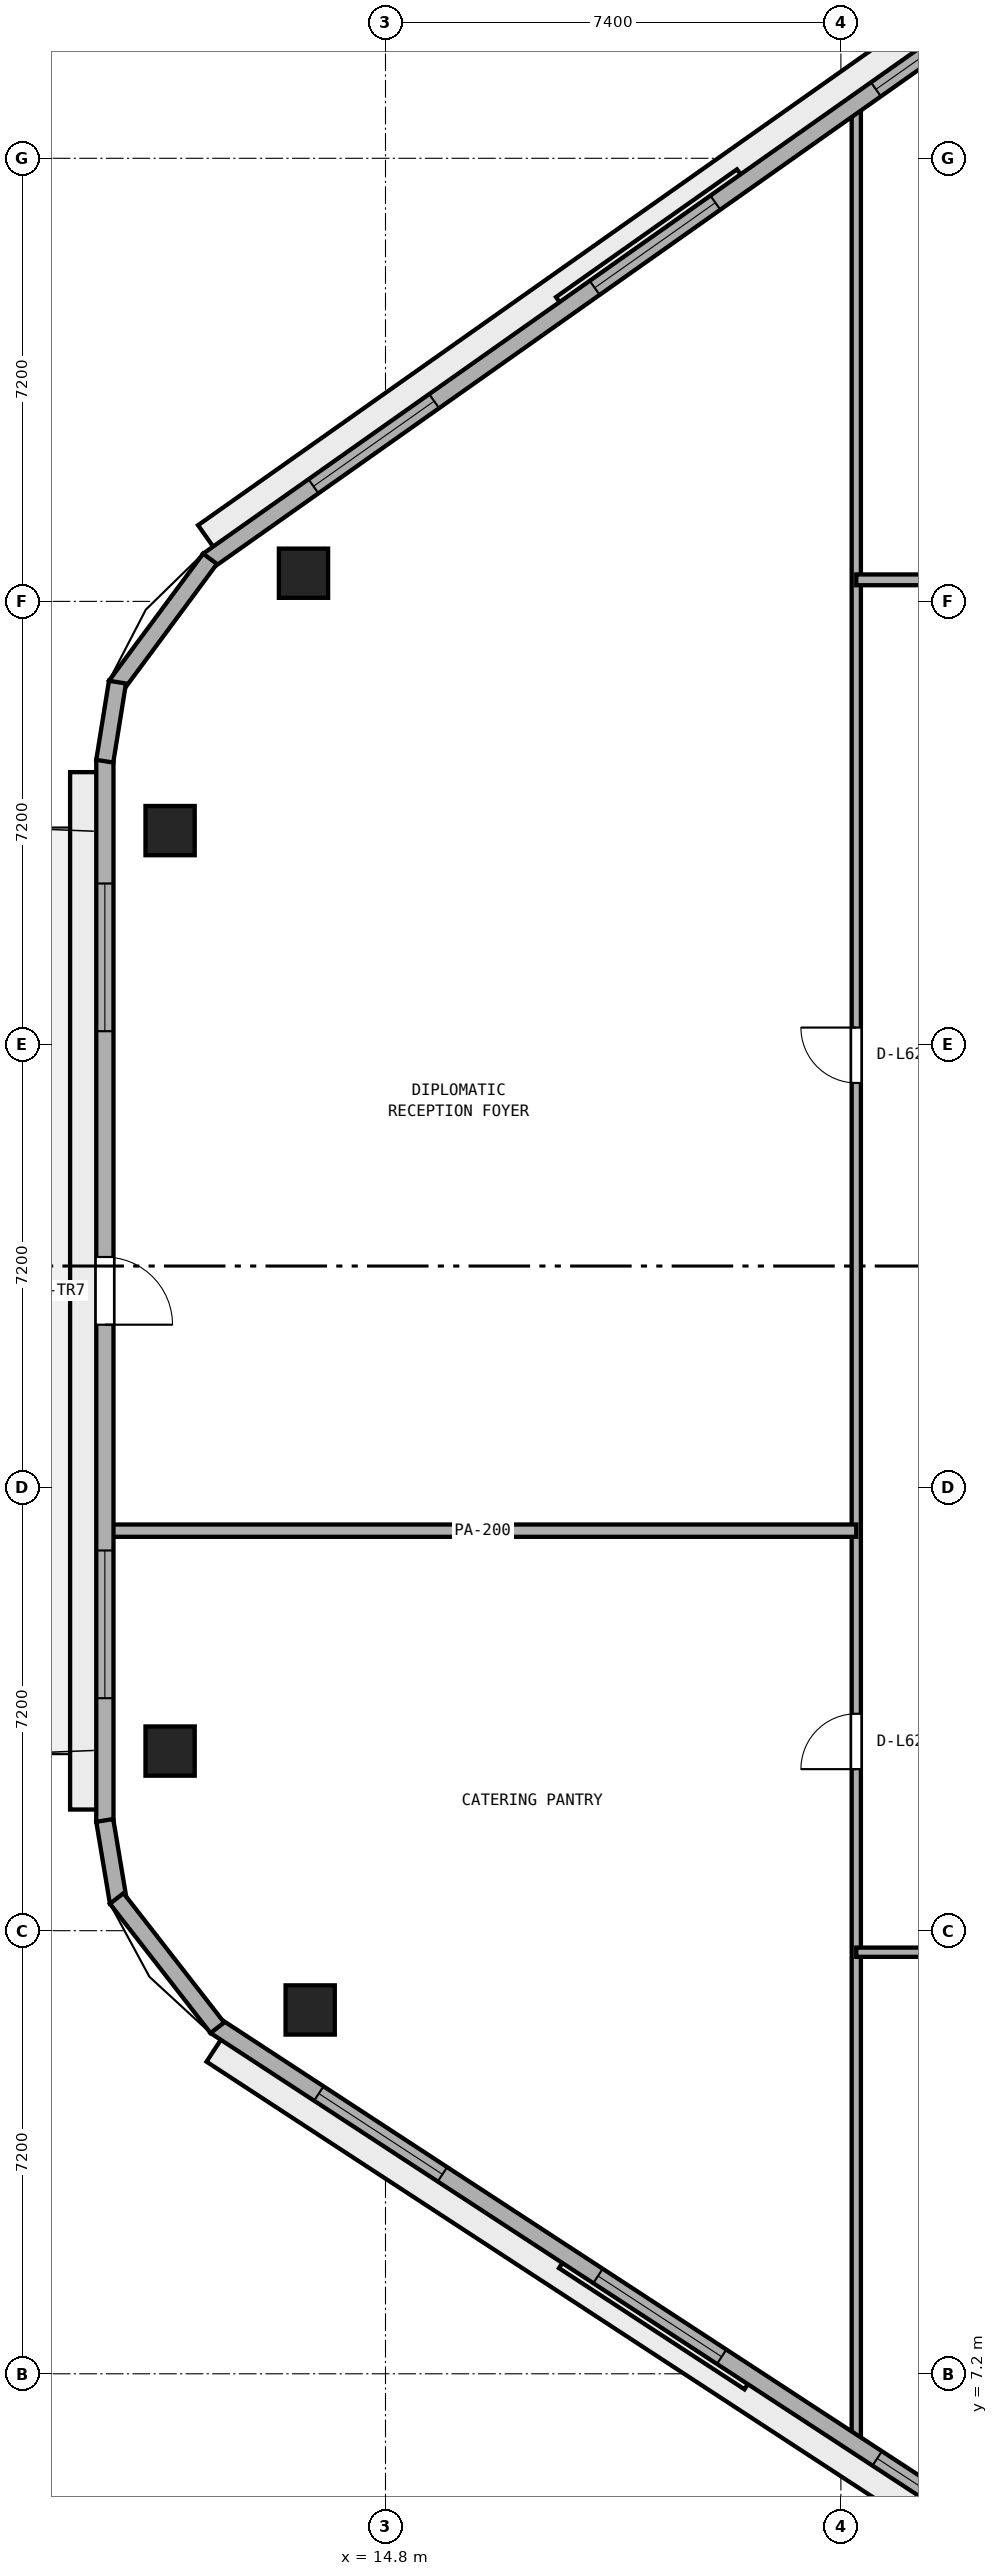
"""IFC4 building model, lengths in metres.
Left out: names, types, materials, properties, quantities, classifications, styles, units other than length and angle.
Written with IfcOpenShell. Run it as: python <this file> out.ifc"""

import sys

from ifc_helpers import new_model, si_unit, direction, frame, frame_2d, origin, origin_2d, place, context, subcontext, project, spatial, rectangle, extrude, element, fill, save


model = new_model("IFC4")
c1 = context("Model", 3, precision=1e-05, world=origin(), true_north=direction((0.0, 1.0)))
c2 = subcontext(c1, "Body", "Model", "MODEL_VIEW")
j1 = project(units=[si_unit("LENGTHUNIT", "METRE"), si_unit("PLANEANGLEUNIT", "RADIAN")], contexts=[c1])
p1 = place(None, origin())
s1 = spatial("IfcSite", under=j1, at=p1, CompositionType="ELEMENT")
p2 = place(p1, origin())
s2 = spatial("IfcBuilding", under=s1, at=p2, CompositionType="ELEMENT")
p3 = place(p2, frame((0.0, 0.0, 244.0)))
s3 = spatial("IfcBuildingStorey", under=s2, at=p3, CompositionType="ELEMENT", Elevation=244.0)
for number, where, z_axis, x_axis in (
    (1, (13.467, 36.458, 0.0), (0.0, 0.0, 1.0), (1.0, 0.0, 0.0)),
    (2, (11.3, 32.275, 0.0), (0.0, 0.0, 1.0), (1.0, 0.0, 0.0)),
    (3, (11.3, 17.319, 0.0), (0.0, 0.0, 1.0), (1.0, 0.0, 0.0)),
    (4, (13.576, 13.112, 0.0), (0.0, 0.0, 1.0), (1.0, 0.0, 0.0)),
):
    element("IfcColumn", number, at=place(p3, frame(where, z_axis=z_axis, x_axis=x_axis)), inside=s3, PredefinedType="COLUMN", context=c2, shape_type="SweptSolid", body=[
        extrude(rectangle(XDim=0.8, YDim=0.8, at=origin_2d()), origin(), (0.0, 0.0, 1.0), 3.8),
    ])
p4 = place(p3, frame((22.45, 6.02, 0.0), z_axis=(0.0, 0.0, 1.0), x_axis=(0.0, 1.0, 0.0)))
e5 = element("IfcWall", 5, at=p4, inside=s3, PredefinedType="PARTITIONING", context=c2, shape_type="SweptSolid", body=[
    extrude(rectangle(XDim=38.106, YDim=0.15, at=frame_2d((19.053, 0.0))), origin(), (0.0, 0.0, 1.0), 3.51),
])
p5 = place(p4, frame((11.005, 0.0, 0.0)))
e6 = element("IfcOpeningElement", 6, at=p5, cuts=e5, PredefinedType="OPENING", context=c2, shape_type="SweptSolid", body=[
    extrude(rectangle(XDim=0.9, YDim=2.1, at=frame_2d((0.45, 1.05))), frame((0.0, 0.085, 0.0), z_axis=(0.0, -1.0, 0.0), x_axis=(1.0, 0.0, 0.0)), (0.0, 0.0, 1.0), 0.17),
])
p6 = place(p4, frame((22.155, 0.0, 0.0)))
e7 = element("IfcOpeningElement", 7, at=p6, cuts=e5, PredefinedType="OPENING", context=c2, shape_type="SweptSolid", body=[
    extrude(rectangle(XDim=0.9, YDim=2.1, at=frame_2d((0.45, 1.05))), frame((0.0, 0.085, 0.0), z_axis=(0.0, -1.0, 0.0), x_axis=(1.0, 0.0, 0.0)), (0.0, 0.0, 1.0), 0.17),
])
p7 = place(p3, frame((22.45, 14.05, 0.0), z_axis=(0.0, 0.0, 1.0), x_axis=(1.0, 0.0, 0.0)))
e8 = element("IfcWall", 8, at=p7, inside=s3, PredefinedType="PARTITIONING", context=c2, shape_type="SweptSolid", body=[
    extrude(rectangle(XDim=13.2, YDim=0.15, at=frame_2d((6.6, 0.0))), origin(), (0.0, 0.0, 1.0), 3.51),
])
p8 = place(p7, frame((6.15, 0.0, 0.0)))
e9 = element("IfcOpeningElement", 9, at=p8, cuts=e8, PredefinedType="OPENING", context=c2, shape_type="SweptSolid", body=[
    extrude(rectangle(XDim=0.9, YDim=2.1, at=frame_2d((0.45, 1.05))), frame((0.0, 0.085, 0.0), z_axis=(0.0, -1.0, 0.0), x_axis=(1.0, 0.0, 0.0)), (0.0, 0.0, 1.0), 0.17),
])
p9 = place(p3, frame((10.305, 20.9, 0.0), z_axis=(0.0, 0.0, 1.0), x_axis=(1.0, 0.0, 0.0)))
e10 = element("IfcWall", 10, at=p9, inside=s3, PredefinedType="PARTITIONING", context=c2, shape_type="SweptSolid", body=[
    extrude(rectangle(XDim=12.145, YDim=0.2, at=frame_2d((6.073, 0.0))), origin(), (0.0, 0.0, 1.0), 3.51),
])
p10 = place(p3, frame((22.45, 36.35, 0.0), z_axis=(0.0, 0.0, 1.0), x_axis=(1.0, 0.0, 0.0)))
e11 = element("IfcWall", 11, at=p10, inside=s3, PredefinedType="PARTITIONING", context=c2, shape_type="SweptSolid", body=[
    extrude(rectangle(XDim=26.15, YDim=0.175, at=frame_2d((13.075, 0.0))), origin(), (0.0, 0.0, 1.0), 3.51),
])
p11 = place(p10, frame((12.575, 0.0, 0.0)))
e12 = element("IfcOpeningElement", 12, at=p11, cuts=e11, PredefinedType="OPENING", context=c2, shape_type="SweptSolid", body=[
    extrude(rectangle(XDim=1.0, YDim=2.12, at=frame_2d((0.5, 1.06))), frame((0.0, 0.097, 0.0), z_axis=(0.0, -1.0, 0.0), x_axis=(1.0, 0.0, 0.0)), (0.0, 0.0, 1.0), 0.195),
])
p12 = place(p3, frame((26.443, 46.913, 0.0), z_axis=(0.0, 0.0, 1.0), x_axis=(-0.817024179766, -0.576603407619, 0.0)))
e13 = element("IfcWall", 13, at=p12, inside=s3, PredefinedType="STANDARD", context=c2, shape_type="SweptSolid", body=[
    extrude(rectangle(XDim=17.78, YDim=0.28, at=frame_2d((8.89, 0.0))), origin(), (0.0, 0.0, 1.0), 3.51),
])
p13 = place(p12, frame((2.097, 0.0, 0.9)))
e14 = element("IfcOpeningElement", 14, at=p13, cuts=e13, PredefinedType="OPENING", context=c2, shape_type="SweptSolid", body=[
    extrude(rectangle(XDim=2.4, YDim=1.75, at=frame_2d((1.2, 0.875))), frame((0.0, 0.15, 0.0), z_axis=(0.0, -1.0, 0.0), x_axis=(1.0, 0.0, 0.0)), (0.0, 0.0, 1.0), 0.3),
])
p14 = place(p12, frame((7.69, 0.0, 0.9)))
e15 = element("IfcOpeningElement", 15, at=p14, cuts=e13, PredefinedType="OPENING", context=c2, shape_type="SweptSolid", body=[
    extrude(rectangle(XDim=2.4, YDim=1.75, at=frame_2d((1.2, 0.875))), frame((0.0, 0.15, 0.0), z_axis=(0.0, -1.0, 0.0), x_axis=(1.0, 0.0, 0.0)), (0.0, 0.0, 1.0), 0.3),
])
p15 = place(p12, frame((13.283, 0.0, 0.9)))
e16 = element("IfcOpeningElement", 16, at=p15, cuts=e13, PredefinedType="OPENING", context=c2, shape_type="SweptSolid", body=[
    extrude(rectangle(XDim=2.4, YDim=1.75, at=frame_2d((1.2, 0.875))), frame((0.0, 0.15, 0.0), z_axis=(0.0, -1.0, 0.0), x_axis=(1.0, 0.0, 0.0)), (0.0, 0.0, 1.0), 0.3),
])
p16 = place(p3, frame((10.24, 33.425, 0.0), z_axis=(0.0, 0.0, 1.0), x_axis=(0.0, -1.0, 0.0)))
e17 = element("IfcWall", 17, at=p16, inside=s3, PredefinedType="STANDARD", context=c2, shape_type="SweptSolid", body=[
    extrude(rectangle(XDim=17.257, YDim=0.28, at=frame_2d((8.628, 0.0))), origin(), (0.0, 0.0, 1.0), 3.51),
])
p17 = place(p16, frame((8.078, 0.0, 0.0)))
e18 = element("IfcOpeningElement", 18, at=p17, cuts=e17, PredefinedType="OPENING", context=c2, shape_type="SweptSolid", body=[
    extrude(rectangle(XDim=1.1, YDim=2.2, at=frame_2d((0.55, 1.1))), frame((0.0, 0.15, 0.0), z_axis=(0.0, -1.0, 0.0), x_axis=(1.0, 0.0, 0.0)), (0.0, 0.0, 1.0), 0.3),
])
p18 = place(p16, frame((2.01, 0.0, 0.9)))
e19 = element("IfcOpeningElement", 19, at=p18, cuts=e17, PredefinedType="OPENING", context=c2, shape_type="SweptSolid", body=[
    extrude(rectangle(XDim=2.4, YDim=1.75, at=frame_2d((1.2, 0.875))), frame((0.0, 0.15, 0.0), z_axis=(0.0, -1.0, 0.0), x_axis=(1.0, 0.0, 0.0)), (0.0, 0.0, 1.0), 0.3),
])
p19 = place(p16, frame((12.847, 0.0, 0.9)))
e20 = element("IfcOpeningElement", 20, at=p19, cuts=e17, PredefinedType="OPENING", context=c2, shape_type="SweptSolid", body=[
    extrude(rectangle(XDim=2.4, YDim=1.75, at=frame_2d((1.2, 0.875))), frame((0.0, 0.15, 0.0), z_axis=(0.0, -1.0, 0.0), x_axis=(1.0, 0.0, 0.0)), (0.0, 0.0, 1.0), 0.3),
])
p20 = place(p3, frame((12.034, 12.854, 0.0), z_axis=(0.0, 0.0, 1.0), x_axis=(0.837118352984, -0.547021812269, 0.0)))
e21 = element("IfcWall", 21, at=p20, inside=s3, PredefinedType="STANDARD", context=c2, shape_type="SweptSolid", body=[
    extrude(rectangle(XDim=17.259, YDim=0.28, at=frame_2d((8.63, 0.0))), origin(), (0.0, 0.0, 1.0), 3.51),
])
p21 = place(p20, frame((2.01, 0.0, 0.9)))
e22 = element("IfcOpeningElement", 22, at=p21, cuts=e21, PredefinedType="OPENING", context=c2, shape_type="SweptSolid", body=[
    extrude(rectangle(XDim=2.4, YDim=1.75, at=frame_2d((1.2, 0.875))), frame((0.0, 0.15, 0.0), z_axis=(0.0, -1.0, 0.0), x_axis=(1.0, 0.0, 0.0)), (0.0, 0.0, 1.0), 0.3),
])
p22 = place(p20, frame((7.43, 0.0, 0.9)))
e23 = element("IfcOpeningElement", 23, at=p22, cuts=e21, PredefinedType="OPENING", context=c2, shape_type="SweptSolid", body=[
    extrude(rectangle(XDim=2.4, YDim=1.75, at=frame_2d((1.2, 0.875))), frame((0.0, 0.15, 0.0), z_axis=(0.0, -1.0, 0.0), x_axis=(1.0, 0.0, 0.0)), (0.0, 0.0, 1.0), 0.3),
])
p23 = place(p20, frame((12.849, 0.0, 0.9)))
e24 = element("IfcOpeningElement", 24, at=p23, cuts=e21, PredefinedType="OPENING", context=c2, shape_type="SweptSolid", body=[
    extrude(rectangle(XDim=2.4, YDim=1.75, at=frame_2d((1.2, 0.875))), frame((0.0, 0.15, 0.0), z_axis=(0.0, -1.0, 0.0), x_axis=(1.0, 0.0, 0.0)), (0.0, 0.0, 1.0), 0.3),
])
p24 = place(p3, frame((11.948, 36.692, 0.0), z_axis=(0.0, 0.0, 1.0), x_axis=(-0.595170751493, -0.803599263668, 0.0)))
e25 = element("IfcWall", 25, at=p24, inside=s3, PredefinedType="STANDARD", context=c2, shape_type="SweptSolid", body=[
    extrude(rectangle(XDim=2.57, YDim=0.28, at=frame_2d((1.285, 0.0))), origin(), (0.0, 0.0, 1.0), 3.51),
])
p25 = place(p3, frame((10.445, 34.688, 0.0), z_axis=(0.0, 0.0, 1.0), x_axis=(-0.158524605336, -0.987355027081, 0.0)))
e26 = element("IfcWall", 26, at=p25, inside=s3, PredefinedType="STANDARD", context=c2, shape_type="SweptSolid", body=[
    extrude(rectangle(XDim=1.301, YDim=0.28, at=frame_2d((0.651, 0.0))), origin(), (0.0, 0.0, 1.0), 3.51),
])
p26 = place(p3, frame((10.238, 16.192, 0.0), z_axis=(0.0, 0.0, 1.0), x_axis=(0.164604311367, -0.986359681191, 0.0)))
e27 = element("IfcWall", 27, at=p26, inside=s3, PredefinedType="STANDARD", context=c2, shape_type="SweptSolid", body=[
    extrude(rectangle(XDim=1.35, YDim=0.28, at=frame_2d((0.675, 0.0))), origin(), (0.0, 0.0, 1.0), 3.51),
])
p27 = place(p3, frame((10.433, 14.923, 0.0), z_axis=(0.0, 0.0, 1.0), x_axis=(0.614181852676, -0.78916452774, 0.0)))
e28 = element("IfcWall", 28, at=p27, inside=s3, PredefinedType="STANDARD", context=c2, shape_type="SweptSolid", body=[
    extrude(rectangle(XDim=2.662, YDim=0.28, at=frame_2d((1.331, 0.0))), origin(), (0.0, 0.0, 1.0), 3.51),
])
p28 = place(p5, origin())
e29 = element("IfcDoor", 29, at=p28, inside=s3, OperationType="SINGLE_SWING_LEFT", PredefinedType="DOOR", context=c2, shape_type="SweptSolid", body=[
    extrude(rectangle(XDim=0.9, YDim=2.1, at=frame_2d((0.45, 1.05))), frame((0.0, 0.025, 0.0), z_axis=(0.0, -1.0, 0.0), x_axis=(1.0, 0.0, 0.0)), (0.0, 0.0, 1.0), 0.05),
])
fill(e6, e29)
p29 = place(p6, origin())
e30 = element("IfcDoor", 30, at=p29, inside=s3, OperationType="SINGLE_SWING_RIGHT", PredefinedType="DOOR", context=c2, shape_type="SweptSolid", body=[
    extrude(rectangle(XDim=0.9, YDim=2.1, at=frame_2d((0.45, 1.05))), frame((0.0, 0.025, 0.0), z_axis=(0.0, -1.0, 0.0), x_axis=(1.0, 0.0, 0.0)), (0.0, 0.0, 1.0), 0.05),
])
fill(e7, e30)
p30 = place(p13, origin())
e31 = element("IfcWindow", 31, at=p30, inside=s3, PartitioningType="SINGLE_PANEL", PredefinedType="WINDOW", context=c2, shape_type="SweptSolid", body=[
    extrude(rectangle(XDim=2.4, YDim=1.75, at=frame_2d((1.2, 0.875))), frame((0.0, 0.03, 0.0), z_axis=(0.0, -1.0, 0.0), x_axis=(1.0, 0.0, 0.0)), (0.0, 0.0, 1.0), 0.06),
])
fill(e14, e31)
p31 = place(p14, origin())
e32 = element("IfcWindow", 32, at=p31, inside=s3, PartitioningType="SINGLE_PANEL", PredefinedType="WINDOW", context=c2, shape_type="SweptSolid", body=[
    extrude(rectangle(XDim=2.4, YDim=1.75, at=frame_2d((1.2, 0.875))), frame((0.0, 0.03, 0.0), z_axis=(0.0, -1.0, 0.0), x_axis=(1.0, 0.0, 0.0)), (0.0, 0.0, 1.0), 0.06),
])
fill(e15, e32)
p32 = place(p15, origin())
e33 = element("IfcWindow", 33, at=p32, inside=s3, PartitioningType="SINGLE_PANEL", PredefinedType="WINDOW", context=c2, shape_type="SweptSolid", body=[
    extrude(rectangle(XDim=2.4, YDim=1.75, at=frame_2d((1.2, 0.875))), frame((0.0, 0.03, 0.0), z_axis=(0.0, -1.0, 0.0), x_axis=(1.0, 0.0, 0.0)), (0.0, 0.0, 1.0), 0.06),
])
fill(e16, e33)
p33 = place(p17, origin())
e34 = element("IfcDoor", 34, at=p33, inside=s3, OperationType="SINGLE_SWING_RIGHT", PredefinedType="DOOR", context=c2, shape_type="SweptSolid", body=[
    extrude(rectangle(XDim=1.1, YDim=2.2, at=frame_2d((0.55, 1.1))), frame((0.0, 0.025, 0.0), z_axis=(0.0, -1.0, 0.0), x_axis=(1.0, 0.0, 0.0)), (0.0, 0.0, 1.0), 0.05),
])
fill(e18, e34)
p34 = place(p18, origin())
e35 = element("IfcWindow", 35, at=p34, inside=s3, PartitioningType="SINGLE_PANEL", PredefinedType="WINDOW", context=c2, shape_type="SweptSolid", body=[
    extrude(rectangle(XDim=2.4, YDim=1.75, at=frame_2d((1.2, 0.875))), frame((0.0, 0.03, 0.0), z_axis=(0.0, -1.0, 0.0), x_axis=(1.0, 0.0, 0.0)), (0.0, 0.0, 1.0), 0.06),
])
fill(e19, e35)
p35 = place(p19, origin())
e36 = element("IfcWindow", 36, at=p35, inside=s3, PartitioningType="SINGLE_PANEL", PredefinedType="WINDOW", context=c2, shape_type="SweptSolid", body=[
    extrude(rectangle(XDim=2.4, YDim=1.75, at=frame_2d((1.2, 0.875))), frame((0.0, 0.03, 0.0), z_axis=(0.0, -1.0, 0.0), x_axis=(1.0, 0.0, 0.0)), (0.0, 0.0, 1.0), 0.06),
])
fill(e20, e36)
p36 = place(p21, origin())
e37 = element("IfcWindow", 37, at=p36, inside=s3, PartitioningType="SINGLE_PANEL", PredefinedType="WINDOW", context=c2, shape_type="SweptSolid", body=[
    extrude(rectangle(XDim=2.4, YDim=1.75, at=frame_2d((1.2, 0.875))), frame((0.0, 0.03, 0.0), z_axis=(0.0, -1.0, 0.0), x_axis=(1.0, 0.0, 0.0)), (0.0, 0.0, 1.0), 0.06),
])
fill(e22, e37)
p37 = place(p22, origin())
e38 = element("IfcWindow", 38, at=p37, inside=s3, PartitioningType="SINGLE_PANEL", PredefinedType="WINDOW", context=c2, shape_type="SweptSolid", body=[
    extrude(rectangle(XDim=2.4, YDim=1.75, at=frame_2d((1.2, 0.875))), frame((0.0, 0.03, 0.0), z_axis=(0.0, -1.0, 0.0), x_axis=(1.0, 0.0, 0.0)), (0.0, 0.0, 1.0), 0.06),
])
fill(e23, e38)
p38 = place(p23, origin())
e39 = element("IfcWindow", 39, at=p38, inside=s3, PartitioningType="SINGLE_PANEL", PredefinedType="WINDOW", context=c2, shape_type="SweptSolid", body=[
    extrude(rectangle(XDim=2.4, YDim=1.75, at=frame_2d((1.2, 0.875))), frame((0.0, 0.03, 0.0), z_axis=(0.0, -1.0, 0.0), x_axis=(1.0, 0.0, 0.0)), (0.0, 0.0, 1.0), 0.06),
])
fill(e24, e39)
save(model, sys.argv[1])
